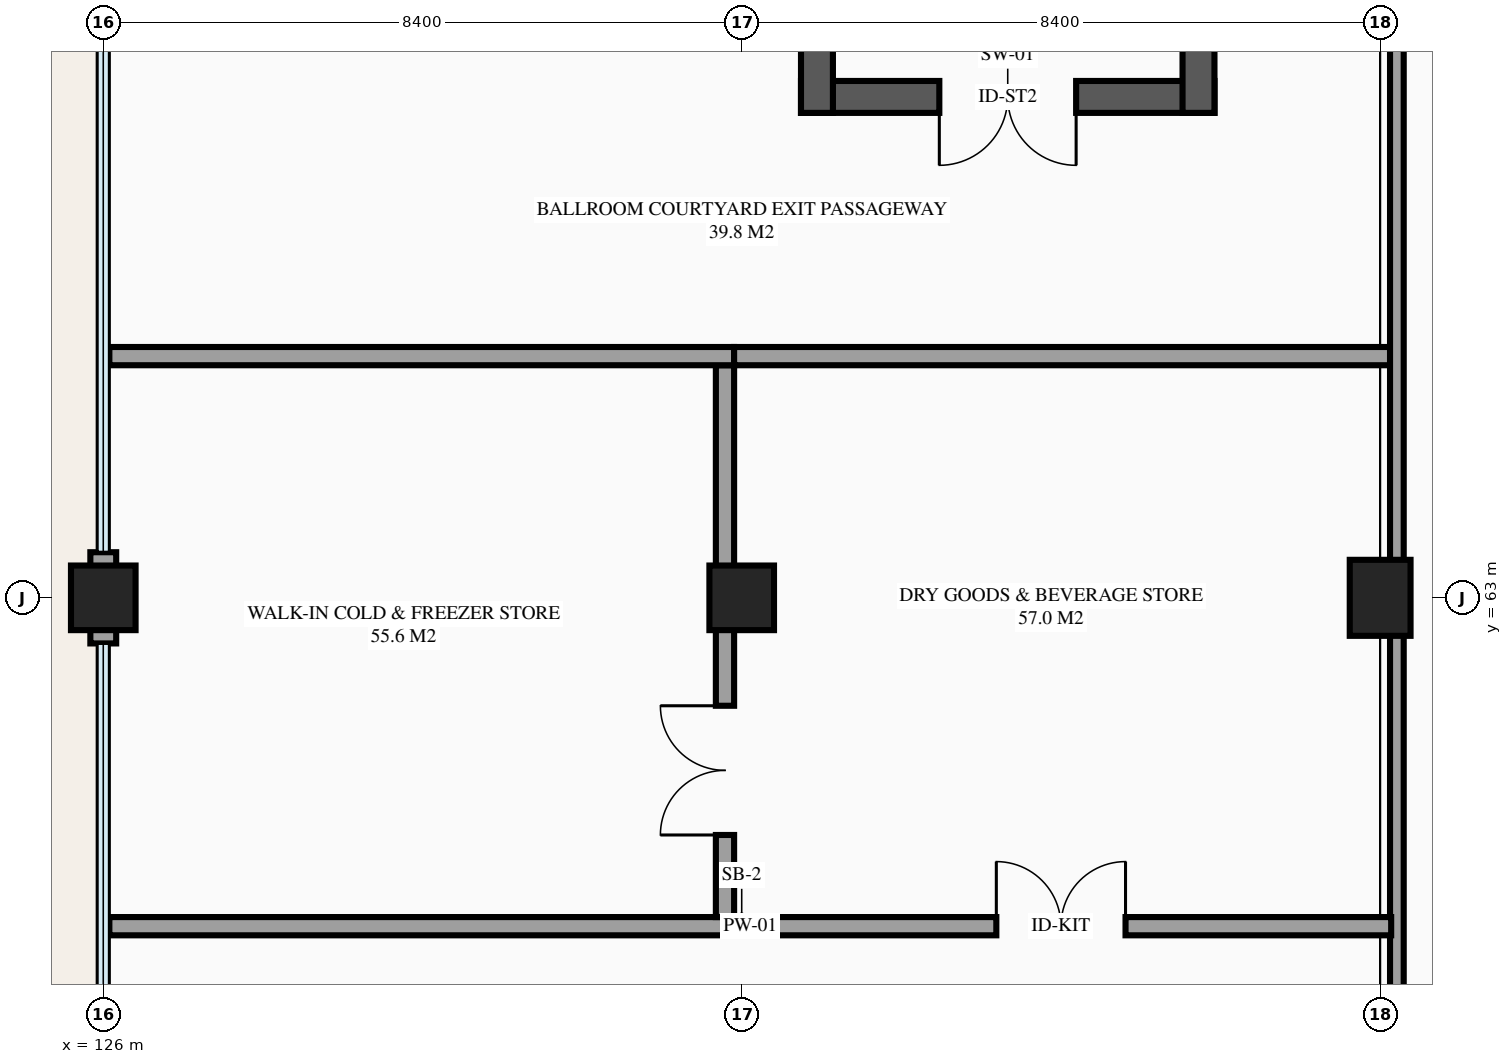
"""IFC4 building model, lengths in metres.
Left out: names, types, materials, properties, quantities, classifications, styles, units other than length and angle.
Written with IfcOpenShell. Run it as: python <this file> out.ifc"""

import sys

from ifc_helpers import new_model, si_unit, direction, frame, frame_2d, origin, origin_2d, place, context, subcontext, project, spatial, rectangle, extrude, element, fill, save


model = new_model("IFC4")
c1 = context("Model", 3, precision=1e-05, world=origin(), true_north=direction((0.0, 1.0)))
c2 = subcontext(c1, "Body", "Model", "MODEL_VIEW")
j1 = project(units=[si_unit("LENGTHUNIT", "METRE"), si_unit("PLANEANGLEUNIT", "RADIAN")], contexts=[c1])
p1 = place(None, origin())
s1 = spatial("IfcSite", under=j1, at=p1, CompositionType="ELEMENT")
p2 = place(p1, origin())
s2 = spatial("IfcBuilding", under=s1, at=p2, CompositionType="ELEMENT")
p3 = place(p2, origin())
s3 = spatial("IfcBuildingStorey", under=s2, at=p3, CompositionType="ELEMENT", Elevation=0.0)
for number, where, z_axis, x_axis in (
    (1, (126.0, 63.0, 0.0), (0.0, 0.0, 1.0), (1.0, 0.0, 0.0)),
    (2, (134.4, 63.0, 0.0), (0.0, 0.0, 1.0), (1.0, 0.0, 0.0)),
):
    element("IfcColumn", number, at=place(p3, frame(where, z_axis=z_axis, x_axis=x_axis)), inside=s3, PredefinedType="COLUMN", context=c2, shape_type="SweptSolid", body=[
        extrude(rectangle(XDim=0.85, YDim=0.85, at=origin_2d()), origin(), (0.0, 0.0, 1.0), 5.4),
    ])
p4 = place(p3, frame((142.8, 63.0, 0.0), z_axis=(0.0, 0.0, 1.0), x_axis=(1.0, 0.0, 0.0)))
e3 = element("IfcColumn", 3, at=p4, inside=s3, PredefinedType="COLUMN", context=c2, shape_type="SweptSolid", body=[
    extrude(rectangle(XDim=0.8, YDim=1.0, at=origin_2d()), origin(), (0.0, 0.0, 1.0), 5.4),
])
for number, where, z_axis, x_axis in (
    (4, (126.0, 63.0, 0.0), (0.0, 0.0, 1.0), (0.0, -1.0, 0.0)),
    (5, (126.0, 63.6, 0.0), (0.0, 0.0, 1.0), (0.0, -1.0, 0.0)),
):
    element("IfcWall", number, at=place(p3, frame(where, z_axis=z_axis, x_axis=x_axis)), inside=s3, PredefinedType="STANDARD", context=c2, shape_type="SweptSolid", body=[
        extrude(rectangle(XDim=0.6, YDim=0.34, at=frame_2d((0.3, 0.0))), origin(), (0.0, 0.0, 1.0), 5.4),
    ])
p5 = place(p3, frame((135.18, 69.59, 0.0), z_axis=(0.0, 0.0, 1.0), x_axis=(1.0, 0.0, 0.0)))
e6 = element("IfcWall", 6, at=p5, inside=s3, PredefinedType="SHEAR", context=c2, shape_type="SweptSolid", body=[
    extrude(rectangle(XDim=5.44, YDim=0.42, at=frame_2d((2.72, 0.0))), origin(), (0.0, 0.0, 1.0), 5.4),
])
p6 = place(p5, frame((3.62, 0.0, 0.0), z_axis=(0.0, 0.0, 1.0), x_axis=(-1.0, 0.0, 0.0)))
e7 = element("IfcOpeningElement", 7, at=p6, cuts=e6, PredefinedType="OPENING", context=c2, shape_type="SweptSolid", body=[
    extrude(rectangle(XDim=1.8, YDim=2.2, at=frame_2d((0.9, 1.1))), frame((0.0, 0.22, 0.0), z_axis=(0.0, -1.0, 0.0), x_axis=(1.0, 0.0, 0.0)), (0.0, 0.0, 1.0), 0.44),
])
for number, where, z_axis, x_axis in (
    (8, (140.41, 69.38, 0.0), (0.0, 0.0, 1.0), (0.0, 1.0, 0.0)),
    (9, (135.39, 78.46, 0.0), (0.0, 0.0, 1.0), (0.0, -1.0, 0.0)),
):
    element("IfcWall", number, at=place(p3, frame(where, z_axis=z_axis, x_axis=x_axis)), inside=s3, PredefinedType="SHEAR", context=c2, shape_type="SweptSolid", body=[
        extrude(rectangle(XDim=9.08, YDim=0.42, at=frame_2d((4.54, 0.0))), origin(), (0.0, 0.0, 1.0), 5.4),
    ])
p7 = place(p3, frame((143.02, 38.11, 0.0), z_axis=(0.0, 0.0, 1.0), x_axis=(0.0, 1.0, 0.0)))
e10 = element("IfcWall", 10, at=p7, inside=s3, PredefinedType="PARTITIONING", context=c2, shape_type="SweptSolid", body=[
    extrude(rectangle(XDim=24.89, YDim=0.18, at=frame_2d((12.445, 0.0))), origin(), (0.0, 0.0, 1.0), 4.24),
])
p8 = place(p3, frame((126.08, 58.68, 0.0), z_axis=(0.0, 0.0, 1.0), x_axis=(1.0, 0.0, 0.0)))
e11 = element("IfcWall", 11, at=p8, inside=s3, PredefinedType="PARTITIONING", context=c2, shape_type="SweptSolid", body=[
    extrude(rectangle(XDim=16.865, YDim=0.24, at=frame_2d((8.433, 0.0))), origin(), (0.0, 0.0, 1.0), 4.54),
])
p9 = place(p8, frame((11.67, 0.0, 0.0)))
e12 = element("IfcOpeningElement", 12, at=p9, cuts=e11, PredefinedType="OPENING", context=c2, shape_type="SweptSolid", body=[
    extrude(rectangle(XDim=1.7, YDim=2.2, at=frame_2d((0.85, 1.1))), frame((0.0, 0.13, 0.0), z_axis=(0.0, -1.0, 0.0), x_axis=(1.0, 0.0, 0.0)), (0.0, 0.0, 1.0), 0.26),
])
p10 = place(p3, frame((134.18, 58.8, 0.0), z_axis=(0.0, 0.0, 1.0), x_axis=(0.0, 1.0, 0.0)))
e13 = element("IfcWall", 13, at=p10, inside=s3, PredefinedType="PARTITIONING", context=c2, shape_type="SweptSolid", body=[
    extrude(rectangle(XDim=7.26, YDim=0.24, at=frame_2d((3.63, 0.0))), origin(), (0.0, 0.0, 1.0), 4.24),
])
p11 = place(p10, frame((1.08, 0.0, 0.0)))
e14 = element("IfcOpeningElement", 14, at=p11, cuts=e13, PredefinedType="OPENING", context=c2, shape_type="SweptSolid", body=[
    extrude(rectangle(XDim=1.7, YDim=2.2, at=frame_2d((0.85, 1.1))), frame((0.0, 0.13, 0.0), z_axis=(0.0, -1.0, 0.0), x_axis=(1.0, 0.0, 0.0)), (0.0, 0.0, 1.0), 0.26),
])
p12 = place(p3, frame((126.08, 66.18, 0.0), z_axis=(0.0, 0.0, 1.0), x_axis=(1.0, 0.0, 0.0)))
e15 = element("IfcWall", 15, at=p12, inside=s3, PredefinedType="PARTITIONING", context=c2, shape_type="SweptSolid", body=[
    extrude(rectangle(XDim=8.22, YDim=0.24, at=frame_2d((4.11, 0.0))), origin(), (0.0, 0.0, 1.0), 5.135),
])
p13 = place(p3, frame((134.3, 66.18, 0.0), z_axis=(0.0, 0.0, 1.0), x_axis=(1.0, 0.0, 0.0)))
e16 = element("IfcWall", 16, at=p13, inside=s3, PredefinedType="PARTITIONING", context=c2, shape_type="SweptSolid", body=[
    extrude(rectangle(XDim=8.645, YDim=0.24, at=frame_2d((4.323, 0.0))), origin(), (0.0, 0.0, 1.0), 5.135),
])
p14 = place(p3, frame((143.02, 63.0, 0.0), z_axis=(0.0, 0.0, 1.0), x_axis=(0.0, 1.0, 0.0)))
e17 = element("IfcWall", 17, at=p14, inside=s3, PredefinedType="PARTITIONING", context=c2, shape_type="SweptSolid", body=[
    extrude(rectangle(XDim=16.58, YDim=0.18, at=frame_2d((8.29, 0.0))), origin(), (0.0, 0.0, 1.0), 4.39),
])
p15 = place(p6, origin())
e18 = element("IfcDoor", 18, at=p15, inside=s3, OperationType="DOUBLE_DOOR_SINGLE_SWING", PredefinedType="DOOR", context=c2, shape_type="SweptSolid", body=[
    extrude(rectangle(XDim=1.8, YDim=2.2, at=frame_2d((0.9, 1.1))), frame((0.0, 0.025, 0.0), z_axis=(0.0, -1.0, 0.0), x_axis=(1.0, 0.0, 0.0)), (0.0, 0.0, 1.0), 0.05),
])
fill(e7, e18)
p16 = place(p9, origin())
e19 = element("IfcDoor", 19, at=p16, inside=s3, OperationType="DOUBLE_DOOR_SINGLE_SWING", PredefinedType="DOOR", context=c2, shape_type="SweptSolid", body=[
    extrude(rectangle(XDim=1.7, YDim=2.2, at=frame_2d((0.85, 1.1))), frame((0.0, 0.025, 0.0), z_axis=(0.0, -1.0, 0.0), x_axis=(1.0, 0.0, 0.0)), (0.0, 0.0, 1.0), 0.05),
])
fill(e12, e19)
p17 = place(p11, origin())
e20 = element("IfcDoor", 20, at=p17, inside=s3, OperationType="DOUBLE_DOOR_SINGLE_SWING", PredefinedType="DOOR", context=c2, shape_type="SweptSolid", body=[
    extrude(rectangle(XDim=1.7, YDim=2.2, at=frame_2d((0.85, 1.1))), frame((0.0, 0.025, 0.0), z_axis=(0.0, -1.0, 0.0), x_axis=(1.0, 0.0, 0.0)), (0.0, 0.0, 1.0), 0.05),
])
fill(e14, e20)
save(model, sys.argv[1])
